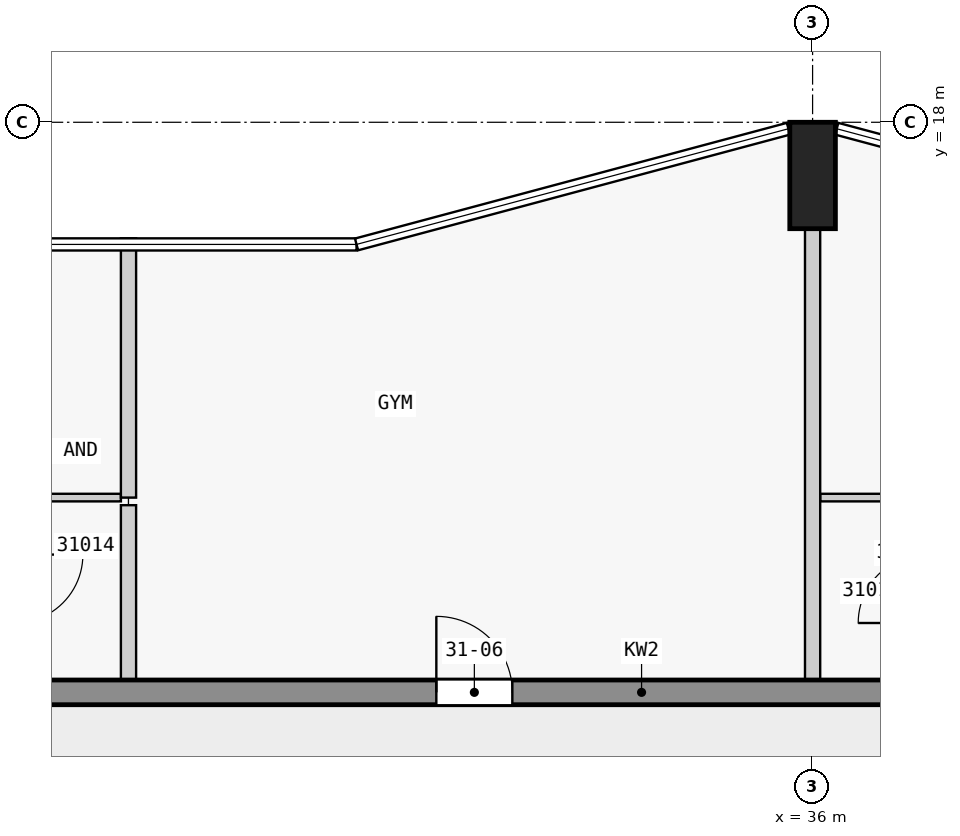
"""IFC4 building model, lengths in metres.
Left out: names, types, materials, properties, quantities, classifications, styles, units other than length and angle.
Written with IfcOpenShell. Run it as: python <this file> out.ifc"""

import sys

from ifc_helpers import new_model, si_unit, direction, frame, frame_2d, origin, origin_2d, place, context, subcontext, project, spatial, rectangle, extrude, element, fill, save


model = new_model("IFC4")
c1 = context("Model", 3, precision=1e-05, world=origin(), true_north=direction((0.0, 1.0)))
c2 = subcontext(c1, "Body", "Model", "MODEL_VIEW")
j1 = project(units=[si_unit("LENGTHUNIT", "METRE"), si_unit("PLANEANGLEUNIT", "RADIAN")], contexts=[c1])
p1 = place(None, origin())
s1 = spatial("IfcSite", under=j1, at=p1, CompositionType="ELEMENT")
p2 = place(p1, origin())
s2 = spatial("IfcBuilding", under=s1, at=p2, CompositionType="ELEMENT")
p3 = place(p2, frame((0.0, 0.0, 120.3)))
s3 = spatial("IfcBuildingStorey", under=s2, at=p3, CompositionType="ELEMENT", Elevation=120.3)
p4 = place(p3, frame((36.0, 17.3, 0.0), z_axis=(0.0, 0.0, 1.0), x_axis=(1.0, 0.0, 0.0)))
e1 = element("IfcColumn", 1, at=p4, inside=s3, PredefinedType="COLUMN", context=c2, shape_type="SweptSolid", body=[
    extrude(rectangle(XDim=0.6, YDim=1.4, at=origin_2d()), origin(), (0.0, 0.0, 1.0), 3.5),
])
p5 = place(p3, frame((22.5, 10.5, 0.0), z_axis=(0.0, 0.0, 1.0), x_axis=(1.0, 0.0, 0.0)))
e2 = element("IfcWall", 2, at=p5, inside=s3, PredefinedType="SHEAR", context=c2, shape_type="SweptSolid", body=[
    extrude(rectangle(XDim=22.5, YDim=0.325, at=frame_2d((11.25, 0.0))), origin(), (0.0, 0.0, 1.0), 3.2),
])
p6 = place(p5, frame((1.75, 0.0, 0.0)))
e3 = element("IfcOpeningElement", 3, at=p6, cuts=e2, PredefinedType="OPENING", context=c2, shape_type="SweptSolid", body=[
    extrude(rectangle(XDim=1.0, YDim=2.1, at=frame_2d((0.5, 1.05))), frame((0.0, 0.172, 0.0), z_axis=(0.0, -1.0, 0.0), x_axis=(1.0, 0.0, 0.0)), (0.0, 0.0, 1.0), 0.345),
])
p7 = place(p5, frame((8.55, 0.0, 0.0)))
e4 = element("IfcOpeningElement", 4, at=p7, cuts=e2, PredefinedType="OPENING", context=c2, shape_type="SweptSolid", body=[
    extrude(rectangle(XDim=1.0, YDim=2.1, at=frame_2d((0.5, 1.05))), frame((0.0, 0.172, 0.0), z_axis=(0.0, -1.0, 0.0), x_axis=(1.0, 0.0, 0.0)), (0.0, 0.0, 1.0), 0.345),
])
p8 = place(p5, frame((15.25, 0.0, 0.0)))
e5 = element("IfcOpeningElement", 5, at=p8, cuts=e2, PredefinedType="OPENING", context=c2, shape_type="SweptSolid", body=[
    extrude(rectangle(XDim=1.0, YDim=2.1, at=frame_2d((0.5, 1.05))), frame((0.0, 0.172, 0.0), z_axis=(0.0, -1.0, 0.0), x_axis=(1.0, 0.0, 0.0)), (0.0, 0.0, 1.0), 0.345),
])
p9 = place(p5, frame((18.75, 0.0, 0.0)))
e6 = element("IfcOpeningElement", 6, at=p9, cuts=e2, PredefinedType="OPENING", context=c2, shape_type="SweptSolid", body=[
    extrude(rectangle(XDim=0.9, YDim=2.1, at=frame_2d((0.45, 1.05))), frame((0.0, 0.172, 0.0), z_axis=(0.0, -1.0, 0.0), x_axis=(1.0, 0.0, 0.0)), (0.0, 0.0, 1.0), 0.345),
])
p10 = place(p5, frame((20.95, 0.0, 0.0)))
e7 = element("IfcOpeningElement", 7, at=p10, cuts=e2, PredefinedType="OPENING", context=c2, shape_type="SweptSolid", body=[
    extrude(rectangle(XDim=1.0, YDim=2.1, at=frame_2d((0.5, 1.05))), frame((0.0, 0.172, 0.0), z_axis=(0.0, -1.0, 0.0), x_axis=(1.0, 0.0, 0.0)), (0.0, 0.0, 1.0), 0.345),
])
for number, where, z_axis, x_axis in (
    (8, (26.9, 13.062, 0.0), (0.0, 0.0, 1.0), (-1.0, 0.0, 0.0)),
    (9, (37.45, 13.062, 0.0), (0.0, 0.0, 1.0), (-1.0, 0.0, 0.0)),
):
    element("IfcWall", number, at=place(p3, frame(where, z_axis=z_axis, x_axis=x_axis)), inside=s3, PredefinedType="PARTITIONING", context=c2, shape_type="SweptSolid", body=[
        extrude(rectangle(XDim=1.35, YDim=0.1, at=frame_2d((0.675, 0.0))), origin(), (0.0, 0.0, 1.0), 3.2),
    ])
p11 = place(p3, frame((27.0, 16.473, 0.0), z_axis=(0.0, 0.0, 1.0), x_axis=(0.0, -1.0, 0.0)))
e10 = element("IfcWall", 10, at=p11, inside=s3, PredefinedType="PARTITIONING", context=c2, shape_type="SweptSolid", body=[
    extrude(rectangle(XDim=3.411, YDim=0.2, at=frame_2d((1.705, 0.0))), origin(), (0.0, 0.0, 1.0), 3.2),
])
p12 = place(p3, frame((27.0, 10.663, 0.0), z_axis=(0.0, 0.0, 1.0), x_axis=(0.0, 1.0, 0.0)))
e11 = element("IfcWall", 11, at=p12, inside=s3, PredefinedType="PARTITIONING", context=c2, shape_type="SweptSolid", body=[
    extrude(rectangle(XDim=2.3, YDim=0.2, at=frame_2d((1.15, 0.0))), origin(), (0.0, 0.0, 1.0), 3.2),
])
p13 = place(p3, frame((36.0, 10.663, 0.0), z_axis=(0.0, 0.0, 1.0), x_axis=(0.0, 1.0, 0.0)))
e12 = element("IfcWall", 12, at=p13, inside=s3, PredefinedType="PARTITIONING", context=c2, shape_type="SweptSolid", body=[
    extrude(rectangle(XDim=5.938, YDim=0.2, at=frame_2d((2.969, 0.0))), origin(), (0.0, 0.0, 1.0), 3.2),
])
p14 = place(p7, origin())
e13 = element("IfcDoor", 13, at=p14, inside=s3, OperationType="SINGLE_SWING_LEFT", PredefinedType="DOOR", context=c2, shape_type="SweptSolid", body=[
    extrude(rectangle(XDim=1.0, YDim=2.1, at=frame_2d((0.5, 1.05))), frame((0.0, 0.025, 0.0), z_axis=(0.0, -1.0, 0.0), x_axis=(1.0, 0.0, 0.0)), (0.0, 0.0, 1.0), 0.05),
])
fill(e4, e13)
save(model, sys.argv[1])
